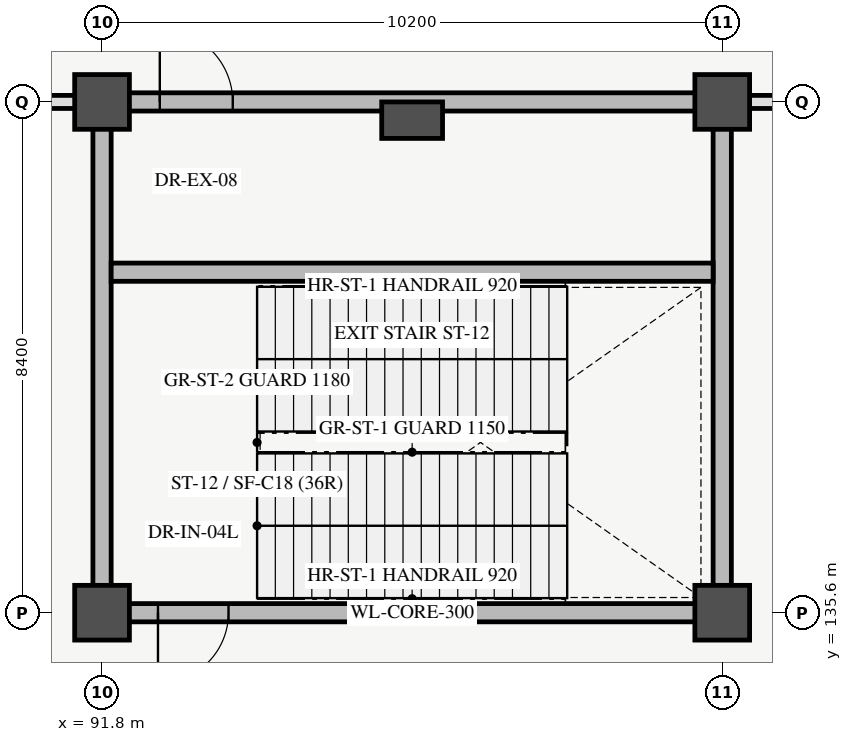
"""IFC4 building model, lengths in metres.
Left out: names, types, materials, properties, quantities, classifications, styles, units other than length and angle.
Written with IfcOpenShell. Run it as: python <this file> out.ifc"""

import sys

from ifc_helpers import new_model, si_unit, direction, frame, frame_2d, origin, origin_2d, place, context, subcontext, project, spatial, rectangle, extrude, element, fill, save


model = new_model("IFC4")
c1 = context("Model", 3, precision=1e-05, world=origin(), true_north=direction((0.0, 1.0)))
c2 = subcontext(c1, "Body", "Model", "MODEL_VIEW")
j1 = project(units=[si_unit("LENGTHUNIT", "METRE"), si_unit("PLANEANGLEUNIT", "RADIAN")], contexts=[c1])
p1 = place(None, origin())
s1 = spatial("IfcSite", under=j1, at=p1, CompositionType="ELEMENT")
p2 = place(p1, origin())
s2 = spatial("IfcBuilding", under=s1, at=p2, CompositionType="ELEMENT")
p3 = place(p2, origin())
s3 = spatial("IfcBuildingStorey", under=s2, at=p3, CompositionType="ELEMENT", Elevation=0.0)
for number, where, z_axis, x_axis in (
    (1, (91.8, 135.6, 0.0), (0.0, 0.0, 1.0), (1.0, 0.0, 0.0)),
    (2, (91.8, 144.0, 0.0), (0.0, 0.0, 1.0), (1.0, 0.0, 0.0)),
    (3, (102.0, 135.6, 0.0), (0.0, 0.0, 1.0), (1.0, 0.0, 0.0)),
    (4, (102.0, 144.0, 0.0), (0.0, 0.0, 1.0), (1.0, 0.0, 0.0)),
):
    element("IfcColumn", number, at=place(p3, frame(where, z_axis=z_axis, x_axis=x_axis)), inside=s3, PredefinedType="COLUMN", context=c2, shape_type="SweptSolid", body=[
        extrude(rectangle(XDim=0.9, YDim=0.9, at=origin_2d()), origin(), (0.0, 0.0, 1.0), 5.4),
    ])
p4 = place(p3, frame((96.9, 143.7, 0.0), z_axis=(0.0, 0.0, 1.0), x_axis=(1.0, 0.0, 0.0)))
e5 = element("IfcColumn", 5, at=p4, inside=s3, PredefinedType="PILASTER", context=c2, shape_type="SweptSolid", body=[
    extrude(rectangle(XDim=1.0, YDim=0.6, at=origin_2d()), origin(), (0.0, 0.0, 1.0), 5.4),
])
p5 = place(p3, frame((81.84, 144.0, 0.0), z_axis=(0.0, 0.0, 1.0), x_axis=(1.0, 0.0, 0.0)))
e6 = element("IfcWall", 6, at=p5, inside=s3, PredefinedType="SOLIDWALL", context=c2, shape_type="SweptSolid", body=[
    extrude(rectangle(XDim=9.72, YDim=0.215, at=frame_2d((4.86, 0.0))), origin(), (0.0, 0.0, 1.0), 3.68),
])
p6 = place(p5, frame((2.274, 0.0, 0.0)))
e7 = element("IfcOpeningElement", 7, at=p6, cuts=e6, PredefinedType="OPENING", context=c2, shape_type="SweptSolid", body=[
    extrude(rectangle(XDim=4.2, YDim=3.25, at=frame_2d((2.1, 1.625))), frame((0.0, 0.117, 0.0), z_axis=(0.0, -1.0, 0.0), x_axis=(1.0, 0.0, 0.0)), (0.0, 0.0, 1.0), 0.235),
])
p7 = place(p3, frame((102.24, 144.0, 0.0), z_axis=(0.0, 0.0, 1.0), x_axis=(1.0, 0.0, 0.0)))
e8 = element("IfcWall", 8, at=p7, inside=s3, PredefinedType="SOLIDWALL", context=c2, shape_type="SweptSolid", body=[
    extrude(rectangle(XDim=9.72, YDim=0.215, at=frame_2d((4.86, 0.0))), origin(), (0.0, 0.0, 1.0), 3.68),
])
p8 = place(p7, frame((1.522, 0.0, 0.0)))
e9 = element("IfcOpeningElement", 9, at=p8, cuts=e8, PredefinedType="OPENING", context=c2, shape_type="SweptSolid", body=[
    extrude(rectangle(XDim=2.4, YDim=2.4, at=frame_2d((1.2, 1.2))), frame((0.0, 0.117, 0.0), z_axis=(0.0, -1.0, 0.0), x_axis=(1.0, 0.0, 0.0)), (0.0, 0.0, 1.0), 0.235),
])
p9 = place(p3, frame((91.8, 135.6, 0.0), z_axis=(0.0, 0.0, 1.0), x_axis=(1.0, 0.0, 0.0)))
e10 = element("IfcWall", 10, at=p9, inside=s3, PredefinedType="SHEAR", context=c2, shape_type="SweptSolid", body=[
    extrude(rectangle(XDim=10.2, YDim=0.3, at=frame_2d((5.1, 0.0))), origin(), (0.0, 0.0, 1.0), 5.4),
])
p10 = place(p9, frame((0.92, 0.0, 0.0)))
e11 = element("IfcOpeningElement", 11, at=p10, cuts=e10, PredefinedType="OPENING", context=c2, shape_type="SweptSolid", body=[
    extrude(rectangle(XDim=1.16, YDim=2.2, at=frame_2d((0.58, 1.1))), frame((0.0, 0.16, 0.0), z_axis=(0.0, -1.0, 0.0), x_axis=(1.0, 0.0, 0.0)), (0.0, 0.0, 1.0), 0.32),
])
p11 = place(p3, frame((91.8, 144.0, 0.0), z_axis=(0.0, 0.0, 1.0), x_axis=(1.0, 0.0, 0.0)))
e12 = element("IfcWall", 12, at=p11, inside=s3, PredefinedType="SHEAR", context=c2, shape_type="SweptSolid", body=[
    extrude(rectangle(XDim=10.2, YDim=0.3, at=frame_2d((5.1, 0.0))), origin(), (0.0, 0.0, 1.0), 5.4),
])
p12 = place(p11, frame((0.95, 0.0, 0.0)))
e13 = element("IfcOpeningElement", 13, at=p12, cuts=e12, PredefinedType="OPENING", context=c2, shape_type="SweptSolid", body=[
    extrude(rectangle(XDim=1.2, YDim=2.2, at=frame_2d((0.6, 1.1))), frame((0.0, 0.16, 0.0), z_axis=(0.0, -1.0, 0.0), x_axis=(1.0, 0.0, 0.0)), (0.0, 0.0, 1.0), 0.32),
])
for number, where, z_axis, x_axis in (
    (14, (91.8, 135.6, 0.0), (0.0, 0.0, 1.0), (0.0, 1.0, 0.0)),
    (15, (102.0, 135.6, 0.0), (0.0, 0.0, 1.0), (0.0, 1.0, 0.0)),
):
    element("IfcWall", number, at=place(p3, frame(where, z_axis=z_axis, x_axis=x_axis)), inside=s3, PredefinedType="SHEAR", context=c2, shape_type="SweptSolid", body=[
        extrude(rectangle(XDim=8.4, YDim=0.3, at=frame_2d((4.2, 0.0))), origin(), (0.0, 0.0, 1.0), 5.4),
    ])
p13 = place(p3, frame((91.95, 141.2, 0.0), z_axis=(0.0, 0.0, 1.0), x_axis=(1.0, 0.0, 0.0)))
e16 = element("IfcWall", 16, at=p13, inside=s3, PredefinedType="SHEAR", context=c2, shape_type="SweptSolid", body=[
    extrude(rectangle(XDim=9.9, YDim=0.3, at=frame_2d((4.95, 0.0))), origin(), (0.0, 0.0, 1.0), 5.4),
])
p14 = place(p10, origin())
e17 = element("IfcDoor", 17, at=p14, inside=s3, OperationType="SINGLE_SWING_LEFT", PredefinedType="DOOR", context=c2, shape_type="SweptSolid", body=[
    extrude(rectangle(XDim=1.16, YDim=2.2, at=frame_2d((0.58, 1.1))), frame((0.0, 0.025, 0.0), z_axis=(0.0, -1.0, 0.0), x_axis=(1.0, 0.0, 0.0)), (0.0, 0.0, 1.0), 0.05),
])
fill(e11, e17)
p15 = place(p12, origin())
e18 = element("IfcDoor", 18, at=p15, inside=s3, OperationType="SINGLE_SWING_LEFT", PredefinedType="DOOR", context=c2, shape_type="SweptSolid", body=[
    extrude(rectangle(XDim=1.2, YDim=2.2, at=frame_2d((0.6, 1.1))), frame((0.0, 0.025, 0.0), z_axis=(0.0, -1.0, 0.0), x_axis=(1.0, 0.0, 0.0)), (0.0, 0.0, 1.0), 0.05),
])
fill(e13, e18)
save(model, sys.argv[1])
